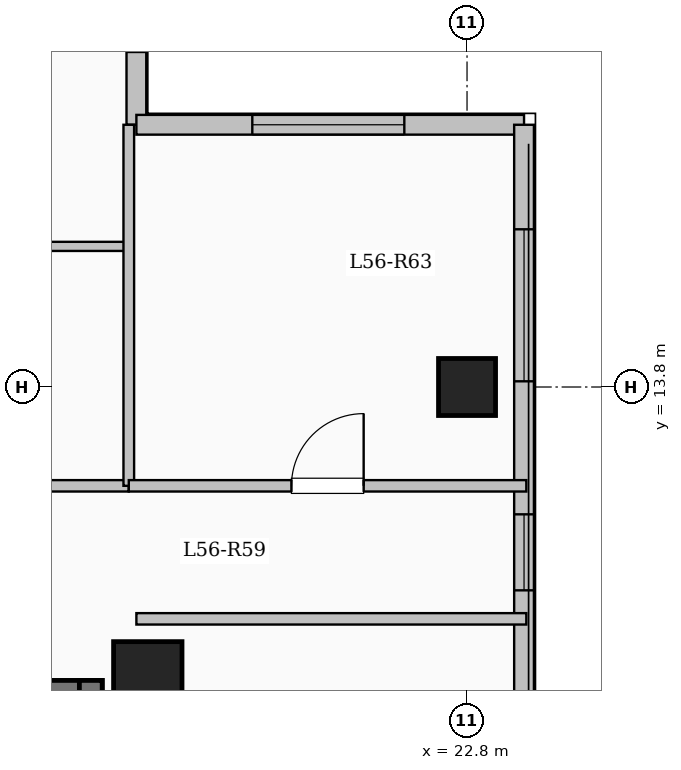
"""IFC4 building model, lengths in metres.
Left out: names, types, materials, properties, quantities, classifications, styles, units other than length and angle.
Written with IfcOpenShell. Run it as: python <this file> out.ifc"""

import sys

from ifc_helpers import new_model, si_unit, direction, frame, frame_2d, origin, origin_2d, place, context, subcontext, project, spatial, rectangle, extrude, element, fill, save


model = new_model("IFC4")
c1 = context("Model", 3, precision=1e-05, world=origin(), true_north=direction((0.0, 1.0)))
c2 = subcontext(c1, "Body", "Model", "MODEL_VIEW")
j1 = project(units=[si_unit("LENGTHUNIT", "METRE"), si_unit("PLANEANGLEUNIT", "RADIAN")], contexts=[c1])
p1 = place(None, origin())
s1 = spatial("IfcSite", under=j1, at=p1, CompositionType="ELEMENT")
p2 = place(p1, origin())
s2 = spatial("IfcBuilding", under=s1, at=p2, CompositionType="ELEMENT")
p3 = place(p2, frame((0.0, 0.0, 207.0)))
s3 = spatial("IfcBuildingStorey", under=s2, at=p3, CompositionType="ELEMENT", Elevation=207.0)
p4 = place(p3, frame((18.6, 10.0, 0.0), z_axis=(0.0, 0.0, 1.0), x_axis=(1.0, 0.0, 0.0)))
e1 = element("IfcColumn", 1, at=p4, inside=s3, PredefinedType="COLUMN", context=c2, shape_type="SweptSolid", body=[
    extrude(rectangle(XDim=0.9, YDim=0.9, at=origin_2d()), origin(), (0.0, 0.0, 1.0), 3.35),
])
p5 = place(p3, frame((22.8, 13.8, 0.0), z_axis=(0.0, 0.0, 1.0), x_axis=(1.0, 0.0, 0.0)))
e2 = element("IfcColumn", 2, at=p5, inside=s3, PredefinedType="COLUMN", context=c2, shape_type="SweptSolid", body=[
    extrude(rectangle(XDim=0.75, YDim=0.75, at=origin_2d()), origin(), (0.0, 0.0, 1.0), 3.35),
])
p6 = place(p3, frame((18.45, 20.85, 0.0), z_axis=(0.0, 0.0, 1.0), x_axis=(0.0, -1.0, 0.0)))
e3 = element("IfcWall", 3, at=p6, inside=s3, PredefinedType="SOLIDWALL", context=c2, shape_type="SweptSolid", body=[
    extrude(rectangle(XDim=3.6, YDim=0.26, at=frame_2d((1.8, 0.0))), origin(), (0.0, 0.0, 1.0), 3.1),
])
p7 = place(p6, frame((0.992, 0.0, 0.9)))
e4 = element("IfcOpeningElement", 4, at=p7, cuts=e3, PredefinedType="OPENING", context=c2, shape_type="SweptSolid", body=[
    extrude(rectangle(XDim=1.65, YDim=1.6, at=frame_2d((0.825, 0.8))), frame((0.0, 0.14, 0.0), z_axis=(0.0, -1.0, 0.0), x_axis=(1.0, 0.0, 0.0)), (0.0, 0.0, 1.0), 0.28),
])
p8 = place(p3, frame((18.45, 17.25, 0.0), z_axis=(0.0, 0.0, 1.0), x_axis=(1.0, 0.0, 0.0)))
e5 = element("IfcWall", 5, at=p8, inside=s3, PredefinedType="SOLIDWALL", context=c2, shape_type="SweptSolid", body=[
    extrude(rectangle(XDim=5.1, YDim=0.26, at=frame_2d((2.55, 0.0))), origin(), (0.0, 0.0, 1.0), 3.1),
])
p9 = place(p8, frame((1.525, 0.0, 0.9)))
e6 = element("IfcOpeningElement", 6, at=p9, cuts=e5, PredefinedType="OPENING", context=c2, shape_type="SweptSolid", body=[
    extrude(rectangle(XDim=2.0, YDim=1.7, at=frame_2d((1.0, 0.85))), frame((0.0, 0.14, 0.0), z_axis=(0.0, -1.0, 0.0), x_axis=(1.0, 0.0, 0.0)), (0.0, 0.0, 1.0), 0.28),
])
p10 = place(p3, frame((23.55, 17.25, 0.0), z_axis=(0.0, 0.0, 1.0), x_axis=(0.0, -1.0, 0.0)))
e7 = element("IfcWall", 7, at=p10, inside=s3, PredefinedType="SOLIDWALL", context=c2, shape_type="SweptSolid", body=[
    extrude(rectangle(XDim=34.5, YDim=0.26, at=frame_2d((17.25, 0.0))), origin(), (0.0, 0.0, 1.0), 3.1),
])
p11 = place(p10, frame((1.375, 0.0, 0.9)))
e8 = element("IfcOpeningElement", 8, at=p11, cuts=e7, PredefinedType="OPENING", context=c2, shape_type="SweptSolid", body=[
    extrude(rectangle(XDim=2.0, YDim=1.7, at=frame_2d((1.0, 0.85))), frame((0.0, 0.14, 0.0), z_axis=(0.0, -1.0, 0.0), x_axis=(1.0, 0.0, 0.0)), (0.0, 0.0, 1.0), 0.28),
])
p12 = place(p10, frame((5.125, 0.0, 0.95)))
e9 = element("IfcOpeningElement", 9, at=p12, cuts=e7, PredefinedType="OPENING", context=c2, shape_type="SweptSolid", body=[
    extrude(rectangle(XDim=1.0, YDim=1.5, at=frame_2d((0.5, 0.75))), frame((0.0, 0.14, 0.0), z_axis=(0.0, -1.0, 0.0), x_axis=(1.0, 0.0, 0.0)), (0.0, 0.0, 1.0), 0.28),
])
p13 = place(p10, frame((8.375, 0.0, 0.9)))
e10 = element("IfcOpeningElement", 10, at=p13, cuts=e7, PredefinedType="OPENING", context=c2, shape_type="SweptSolid", body=[
    extrude(rectangle(XDim=2.0, YDim=1.7, at=frame_2d((1.0, 0.85))), frame((0.0, 0.14, 0.0), z_axis=(0.0, -1.0, 0.0), x_axis=(1.0, 0.0, 0.0)), (0.0, 0.0, 1.0), 0.28),
])
p14 = place(p10, frame((13.2, 0.0, 0.9)))
e11 = element("IfcOpeningElement", 11, at=p14, cuts=e7, PredefinedType="OPENING", context=c2, shape_type="SweptSolid", body=[
    extrude(rectangle(XDim=1.65, YDim=1.6, at=frame_2d((0.825, 0.8))), frame((0.0, 0.14, 0.0), z_axis=(0.0, -1.0, 0.0), x_axis=(1.0, 0.0, 0.0)), (0.0, 0.0, 1.0), 0.28),
])
p15 = place(p10, frame((19.05, 0.0, 0.9)))
e12 = element("IfcOpeningElement", 12, at=p15, cuts=e7, PredefinedType="OPENING", context=c2, shape_type="SweptSolid", body=[
    extrude(rectangle(XDim=2.2, YDim=1.75, at=frame_2d((1.1, 0.875))), frame((0.0, 0.14, 0.0), z_axis=(0.0, -1.0, 0.0), x_axis=(1.0, 0.0, 0.0)), (0.0, 0.0, 1.0), 0.28),
])
p16 = place(p10, frame((24.975, 0.0, 0.95)))
e13 = element("IfcOpeningElement", 13, at=p16, cuts=e7, PredefinedType="OPENING", context=c2, shape_type="SweptSolid", body=[
    extrude(rectangle(XDim=1.2, YDim=1.5, at=frame_2d((0.6, 0.75))), frame((0.0, 0.14, 0.0), z_axis=(0.0, -1.0, 0.0), x_axis=(1.0, 0.0, 0.0)), (0.0, 0.0, 1.0), 0.28),
])
p17 = place(p10, frame((29.475, 0.0, 0.9)))
e14 = element("IfcOpeningElement", 14, at=p17, cuts=e7, PredefinedType="OPENING", context=c2, shape_type="SweptSolid", body=[
    extrude(rectangle(XDim=2.2, YDim=1.75, at=frame_2d((1.1, 0.875))), frame((0.0, 0.14, 0.0), z_axis=(0.0, -1.0, 0.0), x_axis=(1.0, 0.0, 0.0)), (0.0, 0.0, 1.0), 0.28),
])
p18 = place(p3, frame((10.0, 9.79, 0.0), z_axis=(0.0, 0.0, 1.0), x_axis=(1.0, 0.0, 0.0)))
e15 = element("IfcWall", 15, at=p18, inside=s3, PredefinedType="SHEAR", context=c2, shape_type="SweptSolid", body=[
    extrude(rectangle(XDim=8.0, YDim=0.3, at=frame_2d((4.0, 0.0))), origin(), (0.0, 0.0, 1.0), 3.35),
])
p19 = place(p3, frame((17.85, 6.35, 0.0), z_axis=(0.0, 0.0, 1.0), x_axis=(0.0, 1.0, 0.0)))
e16 = element("IfcWall", 16, at=p19, inside=s3, PredefinedType="SHEAR", context=c2, shape_type="SweptSolid", body=[
    extrude(rectangle(XDim=3.59, YDim=0.3, at=frame_2d((1.795, 0.0))), origin(), (0.0, 0.0, 1.0), 3.35),
])
p20 = place(p3, frame((3.85, 12.5, 0.0), z_axis=(0.0, 0.0, 1.0), x_axis=(1.0, 0.0, 0.0)))
e17 = element("IfcWall", 17, at=p20, inside=s3, PredefinedType="PARTITIONING", context=c2, shape_type="SweptSolid", body=[
    extrude(rectangle(XDim=14.5, YDim=0.15, at=frame_2d((7.25, 0.0))), origin(), (0.0, 0.0, 1.0), 3.1),
])
p21 = place(p20, frame((1.45, 0.0, 0.0)))
e18 = element("IfcOpeningElement", 18, at=p21, cuts=e17, PredefinedType="OPENING", context=c2, shape_type="SweptSolid", body=[
    extrude(rectangle(XDim=0.96, YDim=2.15, at=frame_2d((0.48, 1.075))), frame((0.0, 0.085, 0.0), z_axis=(0.0, -1.0, 0.0), x_axis=(1.0, 0.0, 0.0)), (0.0, 0.0, 1.0), 0.17),
])
p22 = place(p20, frame((6.35, 0.0, 0.0)))
e19 = element("IfcOpeningElement", 19, at=p22, cuts=e17, PredefinedType="OPENING", context=c2, shape_type="SweptSolid", body=[
    extrude(rectangle(XDim=0.96, YDim=2.15, at=frame_2d((0.48, 1.075))), frame((0.0, 0.085, 0.0), z_axis=(0.0, -1.0, 0.0), x_axis=(1.0, 0.0, 0.0)), (0.0, 0.0, 1.0), 0.17),
])
p23 = place(p3, frame((13.865, 15.65, 0.0), z_axis=(0.0, 0.0, 1.0), x_axis=(1.0, 0.0, 0.0)))
e20 = element("IfcWall", 20, at=p23, inside=s3, PredefinedType="PARTITIONING", context=c2, shape_type="SweptSolid", body=[
    extrude(rectangle(XDim=4.545, YDim=0.12, at=frame_2d((2.272, 0.0))), origin(), (0.0, 0.0, 1.0), 2.725),
])
p24 = place(p3, frame((18.45, 10.75, 0.0), z_axis=(0.0, 0.0, 1.0), x_axis=(1.0, 0.0, 0.0)))
e21 = element("IfcWall", 21, at=p24, inside=s3, PredefinedType="PARTITIONING", context=c2, shape_type="SweptSolid", body=[
    extrude(rectangle(XDim=5.13, YDim=0.15, at=frame_2d((2.565, 0.0))), origin(), (0.0, 0.0, 1.0), 3.1),
])
p25 = place(p3, frame((18.35, 12.5, 0.0), z_axis=(0.0, 0.0, 1.0), x_axis=(0.0, 1.0, 0.0)))
e22 = element("IfcWall", 22, at=p25, inside=s3, PredefinedType="PARTITIONING", context=c2, shape_type="SweptSolid", body=[
    extrude(rectangle(XDim=4.75, YDim=0.14, at=frame_2d((2.375, 0.0))), origin(), (0.0, 0.0, 1.0), 3.1),
])
p26 = place(p3, frame((18.35, 12.5, 0.0), z_axis=(0.0, 0.0, 1.0), x_axis=(1.0, 0.0, 0.0)))
e23 = element("IfcWall", 23, at=p26, inside=s3, PredefinedType="PARTITIONING", context=c2, shape_type="SweptSolid", body=[
    extrude(rectangle(XDim=5.23, YDim=0.15, at=frame_2d((2.615, 0.0))), origin(), (0.0, 0.0, 1.0), 3.1),
])
p27 = place(p26, frame((2.14, 0.0, 0.0)))
e24 = element("IfcOpeningElement", 24, at=p27, cuts=e23, PredefinedType="OPENING", context=c2, shape_type="SweptSolid", body=[
    extrude(rectangle(XDim=0.95, YDim=2.15, at=frame_2d((0.475, 1.075))), frame((0.0, 0.085, 0.0), z_axis=(0.0, -1.0, 0.0), x_axis=(1.0, 0.0, 0.0)), (0.0, 0.0, 1.0), 0.17),
])
p28 = place(p9, origin())
e25 = element("IfcWindow", 25, at=p28, inside=s3, PartitioningType="SINGLE_PANEL", PredefinedType="WINDOW", context=c2, shape_type="SweptSolid", body=[
    extrude(rectangle(XDim=2.0, YDim=1.7, at=frame_2d((1.0, 0.85))), frame((0.0, 0.03, 0.0), z_axis=(0.0, -1.0, 0.0), x_axis=(1.0, 0.0, 0.0)), (0.0, 0.0, 1.0), 0.06),
])
fill(e6, e25)
p29 = place(p11, origin())
e26 = element("IfcWindow", 26, at=p29, inside=s3, PartitioningType="SINGLE_PANEL", PredefinedType="WINDOW", context=c2, shape_type="SweptSolid", body=[
    extrude(rectangle(XDim=2.0, YDim=1.7, at=frame_2d((1.0, 0.85))), frame((0.0, 0.03, 0.0), z_axis=(0.0, -1.0, 0.0), x_axis=(1.0, 0.0, 0.0)), (0.0, 0.0, 1.0), 0.06),
])
fill(e8, e26)
p30 = place(p12, origin())
e27 = element("IfcWindow", 27, at=p30, inside=s3, PartitioningType="SINGLE_PANEL", PredefinedType="WINDOW", context=c2, shape_type="SweptSolid", body=[
    extrude(rectangle(XDim=1.0, YDim=1.5, at=frame_2d((0.5, 0.75))), frame((0.0, 0.03, 0.0), z_axis=(0.0, -1.0, 0.0), x_axis=(1.0, 0.0, 0.0)), (0.0, 0.0, 1.0), 0.06),
])
fill(e9, e27)
p31 = place(p27, origin())
e28 = element("IfcDoor", 28, at=p31, inside=s3, OperationType="SINGLE_SWING_RIGHT", PredefinedType="DOOR", context=c2, shape_type="SweptSolid", body=[
    extrude(rectangle(XDim=0.95, YDim=2.15, at=frame_2d((0.475, 1.075))), frame((0.0, 0.025, 0.0), z_axis=(0.0, -1.0, 0.0), x_axis=(1.0, 0.0, 0.0)), (0.0, 0.0, 1.0), 0.05),
])
fill(e24, e28)
save(model, sys.argv[1])
